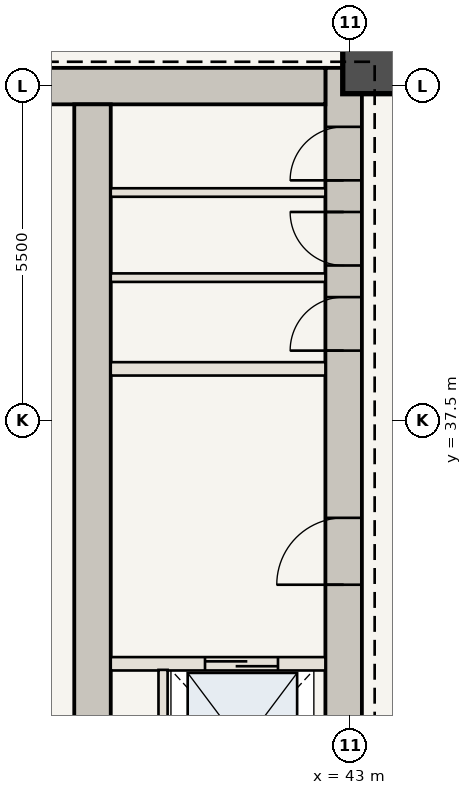
"""IFC4 building model, lengths in metres.
Left out: names, types, materials, properties, quantities, classifications, styles, units other than length and angle.
Written with IfcOpenShell. Run it as: python <this file> out.ifc"""

import sys

from ifc_helpers import new_model, si_unit, direction, frame, frame_2d, origin, origin_2d, place, context, subcontext, project, spatial, rectangle, extrude, element, fill, save


model = new_model("IFC4")
c1 = context("Model", 3, precision=1e-05, world=origin(), true_north=direction((0.0, 1.0)))
c2 = subcontext(c1, "Body", "Model", "MODEL_VIEW")
j1 = project(units=[si_unit("LENGTHUNIT", "METRE"), si_unit("PLANEANGLEUNIT", "RADIAN")], contexts=[c1])
p1 = place(None, origin())
s1 = spatial("IfcSite", under=j1, at=p1, CompositionType="ELEMENT")
p2 = place(p1, origin())
s2 = spatial("IfcBuilding", under=s1, at=p2, CompositionType="ELEMENT")
p3 = place(p2, frame((0.0, 0.0, 152.95)))
s3 = spatial("IfcBuildingStorey", under=s2, at=p3, CompositionType="ELEMENT", Elevation=152.95)
p4 = place(p3, frame((42.89, 30.6, 0.0), z_axis=(0.0, 0.0, 1.0), x_axis=(0.0, 1.0, 0.0)))
e1 = element("IfcWall", 1, at=p4, inside=s3, PredefinedType="SHEAR", context=c2, shape_type="SweptSolid", body=[
    extrude(rectangle(XDim=12.7, YDim=0.6, at=frame_2d((6.35, 0.0))), origin(), (0.0, 0.0, 1.0), 3.85),
])
p5 = place(p4, frame((4.2, 0.0, 0.0)))
e2 = element("IfcOpeningElement", 2, at=p5, cuts=e1, PredefinedType="OPENING", context=c2, shape_type="SweptSolid", body=[
    extrude(rectangle(XDim=1.1, YDim=2.15, at=frame_2d((0.55, 1.075))), frame((0.0, 0.31, 0.0), z_axis=(0.0, -1.0, 0.0), x_axis=(1.0, 0.0, 0.0)), (0.0, 0.0, 1.0), 0.62),
])
p6 = place(p4, frame((8.05, 0.0, 0.0)))
e3 = element("IfcOpeningElement", 3, at=p6, cuts=e1, PredefinedType="OPENING", context=c2, shape_type="SweptSolid", body=[
    extrude(rectangle(XDim=0.88, YDim=2.1, at=frame_2d((0.44, 1.05))), frame((0.0, 0.31, 0.0), z_axis=(0.0, -1.0, 0.0), x_axis=(1.0, 0.0, 0.0)), (0.0, 0.0, 1.0), 0.62),
])
p7 = place(p4, frame((9.45, 0.0, 0.0)))
e4 = element("IfcOpeningElement", 4, at=p7, cuts=e1, PredefinedType="OPENING", context=c2, shape_type="SweptSolid", body=[
    extrude(rectangle(XDim=0.88, YDim=2.1, at=frame_2d((0.44, 1.05))), frame((0.0, 0.31, 0.0), z_axis=(0.0, -1.0, 0.0), x_axis=(1.0, 0.0, 0.0)), (0.0, 0.0, 1.0), 0.62),
])
p8 = place(p4, frame((10.85, 0.0, 0.0)))
e5 = element("IfcOpeningElement", 5, at=p8, cuts=e1, PredefinedType="OPENING", context=c2, shape_type="SweptSolid", body=[
    extrude(rectangle(XDim=0.88, YDim=2.1, at=frame_2d((0.44, 1.05))), frame((0.0, 0.31, 0.0), z_axis=(0.0, -1.0, 0.0), x_axis=(1.0, 0.0, 0.0)), (0.0, 0.0, 1.0), 0.62),
])
p9 = place(p3, frame((37.75, 43.0, 0.0), z_axis=(0.0, 0.0, 1.0), x_axis=(1.0, 0.0, 0.0)))
e6 = element("IfcWall", 6, at=p9, inside=s3, PredefinedType="SHEAR", context=c2, shape_type="SweptSolid", body=[
    extrude(rectangle(XDim=4.84, YDim=0.6, at=frame_2d((2.42, 0.0))), origin(), (0.0, 0.0, 1.0), 3.85),
])
p10 = place(p3, frame((38.76, 30.6, 0.0), z_axis=(0.0, 0.0, 1.0), x_axis=(0.0, 1.0, 0.0)))
e7 = element("IfcWall", 7, at=p10, inside=s3, PredefinedType="SHEAR", context=c2, shape_type="SweptSolid", body=[
    extrude(rectangle(XDim=12.1, YDim=0.6, at=frame_2d((6.05, 0.0))), origin(), (0.0, 0.0, 1.0), 3.85),
])
p11 = place(p3, frame((43.35, 43.35, 0.0), z_axis=(0.0, 0.0, 1.0), x_axis=(1.0, 0.0, 0.0)))
e8 = element("IfcColumn", 8, at=p11, inside=s3, PredefinedType="COLUMN", context=c2, shape_type="SweptSolid", body=[
    extrude(rectangle(XDim=0.95, YDim=0.95, at=origin_2d()), origin(), (0.0, 0.0, 1.0), 3.85),
])
p12 = place(p3, frame((39.06, 33.5, 0.0), z_axis=(0.0, 0.0, 1.0), x_axis=(1.0, 0.0, 0.0)))
e9 = element("IfcWall", 9, at=p12, inside=s3, PredefinedType="STANDARD", context=c2, shape_type="SweptSolid", body=[
    extrude(rectangle(XDim=3.53, YDim=0.22, at=frame_2d((1.765, 0.0))), origin(), (0.0, 0.0, 1.0), 3.685),
])
p13 = place(p12, frame((1.55, 0.0, 0.0)))
e10 = element("IfcOpeningElement", 10, at=p13, cuts=e9, PredefinedType="OPENING", context=c2, shape_type="SweptSolid", body=[
    extrude(rectangle(XDim=1.2, YDim=2.2, at=frame_2d((0.6, 1.1))), frame((0.0, 0.12, 0.0), z_axis=(0.0, -1.0, 0.0), x_axis=(1.0, 0.0, 0.0)), (0.0, 0.0, 1.0), 0.24),
])
p14 = place(p3, frame((39.92, 30.75, 0.0), z_axis=(0.0, 0.0, 1.0), x_axis=(0.0, 1.0, 0.0)))
e11 = element("IfcWall", 11, at=p14, inside=s3, PredefinedType="STANDARD", context=c2, shape_type="SweptSolid", body=[
    extrude(rectangle(XDim=2.65, YDim=0.15, at=frame_2d((1.325, 0.0))), origin(), (0.0, 0.0, 1.0), 3.685),
])
p15 = place(p3, frame((39.06, 38.35, 0.0), z_axis=(0.0, 0.0, 1.0), x_axis=(1.0, 0.0, 0.0)))
e12 = element("IfcWall", 12, at=p15, inside=s3, PredefinedType="STANDARD", context=c2, shape_type="SweptSolid", body=[
    extrude(rectangle(XDim=3.53, YDim=0.22, at=frame_2d((1.765, 0.0))), origin(), (0.0, 0.0, 1.0), 3.685),
])
for number, where, z_axis, x_axis in (
    (13, (39.06, 39.85, 0.0), (0.0, 0.0, 1.0), (1.0, 0.0, 0.0)),
    (14, (39.06, 41.25, 0.0), (0.0, 0.0, 1.0), (1.0, 0.0, 0.0)),
):
    element("IfcWall", number, at=place(p3, frame(where, z_axis=z_axis, x_axis=x_axis)), inside=s3, PredefinedType="STANDARD", context=c2, shape_type="SweptSolid", body=[
        extrude(rectangle(XDim=3.53, YDim=0.14, at=frame_2d((1.765, 0.0))), origin(), (0.0, 0.0, 1.0), 3.685),
    ])
p16 = place(p5, origin())
e15 = element("IfcDoor", 15, at=p16, inside=s3, OperationType="SINGLE_SWING_LEFT", PredefinedType="DOOR", context=c2, shape_type="SweptSolid", body=[
    extrude(rectangle(XDim=1.1, YDim=2.15, at=frame_2d((0.55, 1.075))), frame((0.0, 0.025, 0.0), z_axis=(0.0, -1.0, 0.0), x_axis=(1.0, 0.0, 0.0)), (0.0, 0.0, 1.0), 0.05),
])
fill(e2, e15)
p17 = place(p6, origin())
e16 = element("IfcDoor", 16, at=p17, inside=s3, OperationType="SINGLE_SWING_LEFT", PredefinedType="DOOR", context=c2, shape_type="SweptSolid", body=[
    extrude(rectangle(XDim=0.88, YDim=2.1, at=frame_2d((0.44, 1.05))), frame((0.0, 0.025, 0.0), z_axis=(0.0, -1.0, 0.0), x_axis=(1.0, 0.0, 0.0)), (0.0, 0.0, 1.0), 0.05),
])
fill(e3, e16)
p18 = place(p7, origin())
e17 = element("IfcDoor", 17, at=p18, inside=s3, OperationType="SINGLE_SWING_RIGHT", PredefinedType="DOOR", context=c2, shape_type="SweptSolid", body=[
    extrude(rectangle(XDim=0.88, YDim=2.1, at=frame_2d((0.44, 1.05))), frame((0.0, 0.025, 0.0), z_axis=(0.0, -1.0, 0.0), x_axis=(1.0, 0.0, 0.0)), (0.0, 0.0, 1.0), 0.05),
])
fill(e4, e17)
p19 = place(p8, origin())
e18 = element("IfcDoor", 18, at=p19, inside=s3, OperationType="SINGLE_SWING_LEFT", PredefinedType="DOOR", context=c2, shape_type="SweptSolid", body=[
    extrude(rectangle(XDim=0.88, YDim=2.1, at=frame_2d((0.44, 1.05))), frame((0.0, 0.025, 0.0), z_axis=(0.0, -1.0, 0.0), x_axis=(1.0, 0.0, 0.0)), (0.0, 0.0, 1.0), 0.05),
])
fill(e5, e18)
p20 = place(p13, origin())
e19 = element("IfcDoor", 19, at=p20, inside=s3, OperationType="DOUBLE_DOOR_SLIDING", PredefinedType="DOOR", context=c2, shape_type="SweptSolid", body=[
    extrude(rectangle(XDim=1.2, YDim=2.2, at=frame_2d((0.6, 1.1))), frame((0.0, 0.025, 0.0), z_axis=(0.0, -1.0, 0.0), x_axis=(1.0, 0.0, 0.0)), (0.0, 0.0, 1.0), 0.05),
])
fill(e10, e19)
save(model, sys.argv[1])
